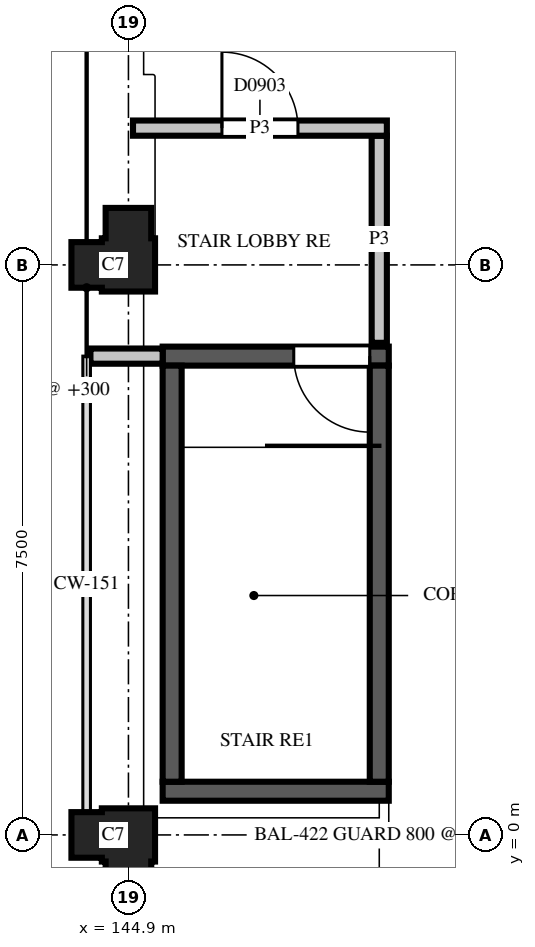
"""IFC4 building model, lengths in metres.
Left out: names, types, materials, properties, quantities, classifications, styles, units other than length and angle.
Written with IfcOpenShell. Run it as: python <this file> out.ifc"""

import sys

from ifc_helpers import new_model, si_unit, direction, frame, frame_2d, origin, place, context, subcontext, project, spatial, polyline, rectangle, outline, extrude, element, fill, save


model = new_model("IFC4")
c1 = context("Model", 3, precision=1e-05, world=origin(), true_north=direction((0.0, 1.0)))
c2 = subcontext(c1, "Body", "Model", "MODEL_VIEW")
j1 = project(units=[si_unit("LENGTHUNIT", "METRE"), si_unit("PLANEANGLEUNIT", "RADIAN")], contexts=[c1])
p1 = place(None, origin())
s1 = spatial("IfcSite", under=j1, at=p1, CompositionType="ELEMENT")
p2 = place(p1, origin())
s2 = spatial("IfcBuilding", under=s1, at=p2, CompositionType="ELEMENT")
p3 = place(p2, frame((0.0, 0.0, 34.1)))
s3 = spatial("IfcBuildingStorey", under=s2, at=p3, CompositionType="ELEMENT", Elevation=34.1)
for number, where, z_axis, x_axis in (
    (1, (144.9, 0.0, 0.0), (0.0, 0.0, 1.0), (-1.0, 0.0, 0.0)),
    (2, (144.9, 7.5, 0.0), (0.0, 0.0, 1.0), (0.0, 1.0, 0.0)),
):
    element("IfcColumn", number, at=place(p3, frame(where, z_axis=z_axis, x_axis=x_axis)), inside=s3, PredefinedType="COLUMN", context=c2, shape_type="SweptSolid", body=[
        extrude(outline(polyline([(-0.35, -0.35), (0.35, -0.35), (0.35, -0.3), (0.75, -0.3), (0.75, 0.3), (0.35, 0.3), (0.35, 0.35), (0.3, 0.35), (0.3, 0.75), (-0.3, 0.75), (-0.3, 0.35), (-0.35, 0.35), (-0.35, -0.35)])), origin(), (0.0, 0.0, 1.0), 3.7),
    ])
p4 = place(p3, frame((145.35, 0.575, 0.0), z_axis=(0.0, 0.0, 1.0), x_axis=(1.0, 0.0, 0.0)))
e3 = element("IfcWall", 3, at=p4, inside=s3, PredefinedType="SHEAR", context=c2, shape_type="SweptSolid", body=[
    extrude(rectangle(XDim=2.975, YDim=0.25, at=frame_2d((1.487, 0.0))), origin(), (0.0, 0.0, 1.0), 3.35),
])
p5 = place(p3, frame((145.35, 6.3, 0.0), z_axis=(0.0, 0.0, 1.0), x_axis=(1.0, 0.0, 0.0)))
e4 = element("IfcWall", 4, at=p5, inside=s3, PredefinedType="SHEAR", context=c2, shape_type="SweptSolid", body=[
    extrude(rectangle(XDim=2.975, YDim=0.25, at=frame_2d((1.487, 0.0))), origin(), (0.0, 0.0, 1.0), 3.35),
])
p6 = place(p5, frame((1.725, 0.0, 0.0)))
e5 = element("IfcOpeningElement", 5, at=p6, cuts=e4, PredefinedType="OPENING", context=c2, shape_type="SweptSolid", body=[
    extrude(rectangle(XDim=1.0, YDim=2.1, at=frame_2d((0.5, 1.05))), frame((0.0, 0.135, 0.0), z_axis=(0.0, -1.0, 0.0), x_axis=(1.0, 0.0, 0.0)), (0.0, 0.0, 1.0), 0.27),
])
for number, where, z_axis, x_axis in (
    (6, (145.475, 0.7, 0.0), (0.0, 0.0, 1.0), (0.0, 1.0, 0.0)),
    (7, (148.2, 0.7, 0.0), (0.0, 0.0, 1.0), (0.0, 1.0, 0.0)),
):
    element("IfcWall", number, at=place(p3, frame(where, z_axis=z_axis, x_axis=x_axis)), inside=s3, PredefinedType="SHEAR", context=c2, shape_type="SweptSolid", body=[
        extrude(rectangle(XDim=5.475, YDim=0.25, at=frame_2d((2.738, 0.0))), origin(), (0.0, 0.0, 1.0), 3.35),
    ])
p7 = place(p3, frame((144.4, 6.3, 0.0), z_axis=(0.0, 0.0, 1.0), x_axis=(1.0, 0.0, 0.0)))
e8 = element("IfcWall", 8, at=p7, inside=s3, PredefinedType="PARTITIONING", context=c2, shape_type="SweptSolid", body=[
    extrude(rectangle(XDim=0.95, YDim=0.2, at=frame_2d((0.475, 0.0))), origin(), (0.0, 0.0, 1.0), 2.88),
])
p8 = place(p3, frame((148.2, 6.475, 0.0), z_axis=(0.0, 0.0, 1.0), x_axis=(0.0, 1.0, 0.0)))
e9 = element("IfcWall", 9, at=p8, inside=s3, PredefinedType="PARTITIONING", context=c2, shape_type="SweptSolid", body=[
    extrude(rectangle(XDim=2.725, YDim=0.2, at=frame_2d((1.362, 0.0))), origin(), (0.0, 0.0, 1.0), 2.88),
])
p9 = place(p3, frame((148.3, 9.3, 0.0), z_axis=(0.0, 0.0, 1.0), x_axis=(-1.0, 0.0, 0.0)))
e10 = element("IfcWall", 10, at=p9, inside=s3, PredefinedType="PARTITIONING", context=c2, shape_type="SweptSolid", body=[
    extrude(rectangle(XDim=3.34, YDim=0.2, at=frame_2d((1.67, 0.0))), origin(), (0.0, 0.0, 1.0), 2.88),
])
p10 = place(p9, frame((1.17, 0.0, 0.0)))
e11 = element("IfcOpeningElement", 11, at=p10, cuts=e10, PredefinedType="OPENING", context=c2, shape_type="SweptSolid", body=[
    extrude(rectangle(XDim=1.0, YDim=2.1, at=frame_2d((0.5, 1.05))), frame((0.0, 0.11, 0.0), z_axis=(0.0, -1.0, 0.0), x_axis=(1.0, 0.0, 0.0)), (0.0, 0.0, 1.0), 0.22),
])
p11 = place(p10, origin())
e12 = element("IfcDoor", 12, at=p11, inside=s3, OperationType="SINGLE_SWING_RIGHT", PredefinedType="DOOR", context=c2, shape_type="SweptSolid", body=[
    extrude(rectangle(XDim=1.0, YDim=2.1, at=frame_2d((0.5, 1.05))), frame((0.0, 0.025, 0.0), z_axis=(0.0, -1.0, 0.0), x_axis=(1.0, 0.0, 0.0)), (0.0, 0.0, 1.0), 0.05),
])
fill(e11, e12)
p12 = place(p6, origin())
e13 = element("IfcDoor", 13, at=p12, inside=s3, OperationType="SINGLE_SWING_RIGHT", PredefinedType="DOOR", context=c2, shape_type="SweptSolid", body=[
    extrude(rectangle(XDim=1.0, YDim=2.1, at=frame_2d((0.5, 1.05))), frame((0.0, 0.025, 0.0), z_axis=(0.0, -1.0, 0.0), x_axis=(1.0, 0.0, 0.0)), (0.0, 0.0, 1.0), 0.05),
])
fill(e5, e13)
save(model, sys.argv[1])
